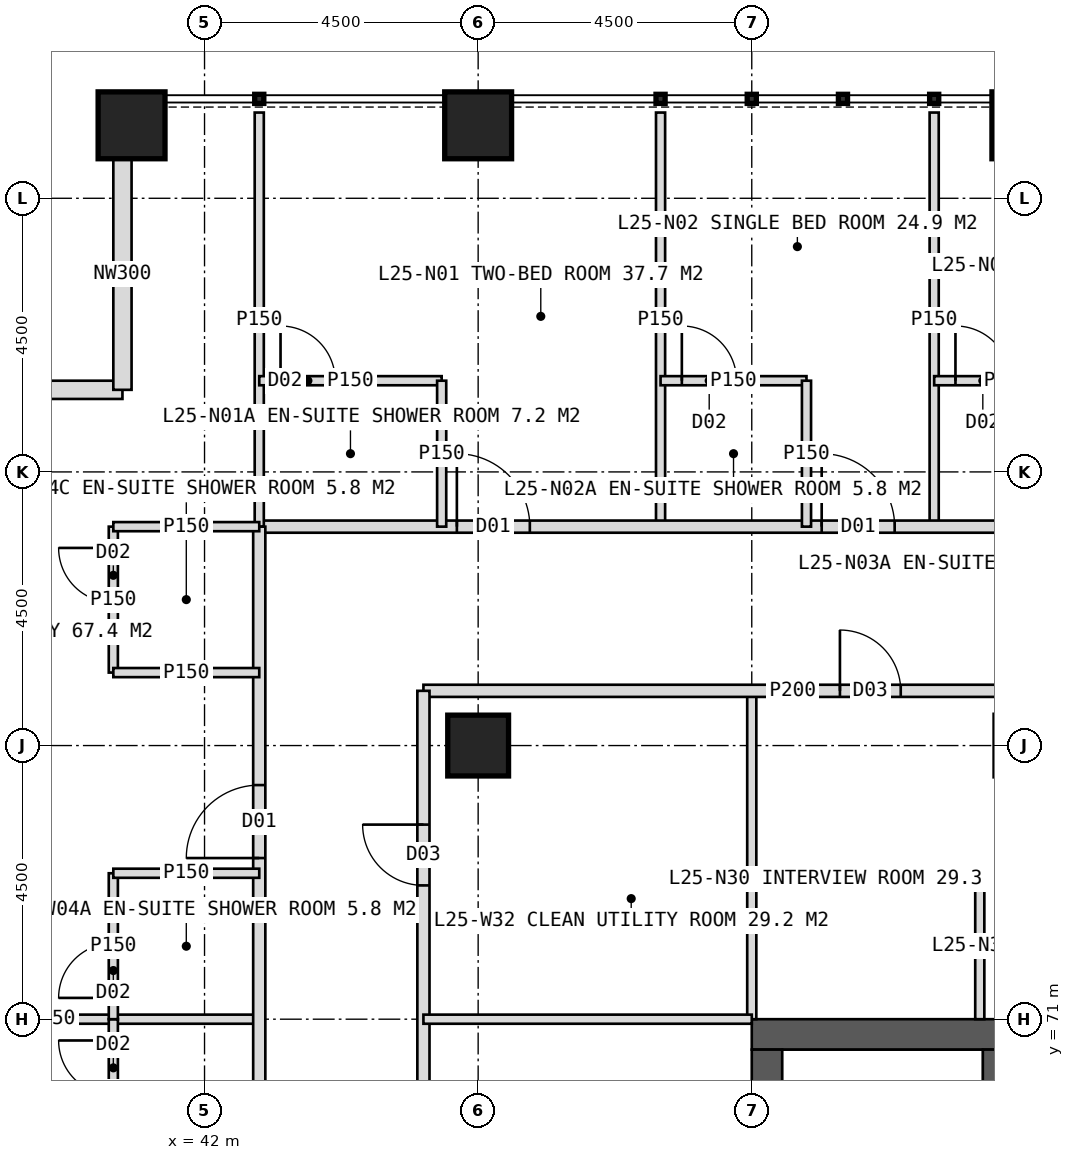
"""IFC4 building model, lengths in metres.
Left out: names, types, materials, properties, quantities, classifications, styles, units other than length and angle.
Written with IfcOpenShell. Run it as: python <this file> out.ifc"""

import sys

from ifc_helpers import new_model, si_unit, direction, frame, frame_2d, origin, origin_2d, place, context, subcontext, project, spatial, rectangle, hollow_rectangle, extrude, element, fill, save


model = new_model("IFC4")
c1 = context("Model", 3, precision=1e-05, world=origin(), true_north=direction((0.0, 1.0)))
c2 = subcontext(c1, "Body", "Model", "MODEL_VIEW")
j1 = project(units=[si_unit("LENGTHUNIT", "METRE"), si_unit("PLANEANGLEUNIT", "RADIAN")], contexts=[c1])
p1 = place(None, origin())
s1 = spatial("IfcSite", under=j1, at=p1, CompositionType="ELEMENT")
p2 = place(p1, origin())
s2 = spatial("IfcBuilding", under=s1, at=p2, CompositionType="ELEMENT")
p3 = place(p2, frame((0.0, 0.0, 108.0)))
s3 = spatial("IfcBuildingStorey", under=s2, at=p3, CompositionType="ELEMENT", Elevation=108.0)
p4 = place(p3, frame((51.0, 70.75, 0.0), z_axis=(0.0, 0.0, 1.0), x_axis=(1.0, 0.0, 0.0)))
e1 = element("IfcWall", 1, at=p4, inside=s3, PredefinedType="SHEAR", context=c2, shape_type="SweptSolid", body=[
    extrude(rectangle(XDim=18.0, YDim=0.5, at=frame_2d((9.0, 0.0))), origin(), (0.0, 0.0, 1.0), 4.0),
])
p5 = place(p4, frame((8.1, 0.0, 0.0)))
e2 = element("IfcOpeningElement", 2, at=p5, cuts=e1, PredefinedType="OPENING", context=c2, shape_type="SweptSolid", body=[
    extrude(rectangle(XDim=1.8, YDim=2.2, at=frame_2d((0.9, 1.1))), frame((0.0, 0.26, 0.0), z_axis=(0.0, -1.0, 0.0), x_axis=(1.0, 0.0, 0.0)), (0.0, 0.0, 1.0), 0.52),
])
p6 = place(p3, frame((51.25, 53.5, 0.0), z_axis=(0.0, 0.0, 1.0), x_axis=(0.0, 1.0, 0.0)))
e3 = element("IfcWall", 3, at=p6, inside=s3, PredefinedType="SHEAR", context=c2, shape_type="SweptSolid", body=[
    extrude(rectangle(XDim=17.0, YDim=0.5, at=frame_2d((8.5, 0.0))), origin(), (0.0, 0.0, 1.0), 4.0),
])
p7 = place(p6, frame((6.0, 0.0, 0.0)))
e4 = element("IfcOpeningElement", 4, at=p7, cuts=e3, PredefinedType="OPENING", context=c2, shape_type="SweptSolid", body=[
    extrude(rectangle(XDim=1.5, YDim=2.2, at=frame_2d((0.75, 1.1))), frame((0.0, 0.26, 0.0), z_axis=(0.0, -1.0, 0.0), x_axis=(1.0, 0.0, 0.0)), (0.0, 0.0, 1.0), 0.52),
])
p8 = place(p3, frame((54.95, 53.5, 0.0), z_axis=(0.0, 0.0, 1.0), x_axis=(0.0, 1.0, 0.0)))
e5 = element("IfcWall", 5, at=p8, inside=s3, PredefinedType="SHEAR", context=c2, shape_type="SweptSolid", body=[
    extrude(rectangle(XDim=17.0, YDim=0.3, at=frame_2d((8.5, 0.0))), origin(), (0.0, 0.0, 1.0), 4.0),
])
p9 = place(p3, frame((46.5, 75.5, 0.0), z_axis=(0.0, 0.0, 1.0), x_axis=(1.0, 0.0, 0.0)))
e6 = element("IfcColumn", 6, at=p9, inside=s3, PredefinedType="COLUMN", context=c2, shape_type="SweptSolid", body=[
    extrude(hollow_rectangle(XDim=1.0, YDim=1.0, WallThickness=0.1, at=origin_2d()), origin(), (0.0, 0.0, 1.0), 4.0),
])
for number, where, z_axis, x_axis in (
    (7, (40.8, 85.7, 0.0), (0.0, 0.0, 1.0), (1.0, 0.0, 0.0)),
    (8, (46.5, 85.7, 0.0), (0.0, 0.0, 1.0), (1.0, 0.0, 0.0)),
    (9, (55.5, 85.7, 0.0), (0.0, 0.0, 1.0), (1.0, 0.0, 0.0)),
):
    element("IfcColumn", number, at=place(p3, frame(where, z_axis=z_axis, x_axis=x_axis)), inside=s3, PredefinedType="COLUMN", context=c2, shape_type="SweptSolid", body=[
        extrude(hollow_rectangle(XDim=1.1, YDim=1.1, WallThickness=0.1, at=origin_2d()), origin(), (0.0, 0.0, 1.0), 4.0),
    ])
for number, where, z_axis, x_axis in (
    (10, (36.85, 81.35, 0.0), (0.0, 0.0, 1.0), (1.0, 0.0, 0.0)),
    (11, (40.65, 81.35, 0.0), (0.0, 0.0, 1.0), (0.0, 1.0, 0.0)),
):
    element("IfcWall", number, at=place(p3, frame(where, z_axis=z_axis, x_axis=x_axis)), inside=s3, PredefinedType="ELEMENTEDWALL", context=c2, shape_type="SweptSolid", body=[
        extrude(rectangle(XDim=3.8, YDim=0.3, at=frame_2d((1.9, 0.0))), origin(), (0.0, 0.0, 1.0), 4.0),
    ])
for number, where, z_axis, x_axis in (
    (12, (49.5, 79.1, 0.0), (0.0, 0.0, 1.0), (0.0, 1.0, 0.0)),
    (13, (54.0, 79.1, 0.0), (0.0, 0.0, 1.0), (0.0, 1.0, 0.0)),
):
    element("IfcWall", number, at=place(p3, frame(where, z_axis=z_axis, x_axis=x_axis)), inside=s3, PredefinedType="PARTITIONING", context=c2, shape_type="SweptSolid", body=[
        extrude(rectangle(XDim=6.81, YDim=0.15, at=frame_2d((3.405, 0.0))), origin(), (0.0, 0.0, 1.0), 3.75),
    ])
p10 = place(p3, frame((42.9, 79.1, 0.0), z_axis=(0.0, 0.0, 1.0), x_axis=(1.0, 0.0, 0.0)))
e14 = element("IfcWall", 14, at=p10, inside=s3, PredefinedType="PARTITIONING", context=c2, shape_type="SweptSolid", body=[
    extrude(rectangle(XDim=34.2, YDim=0.2, at=frame_2d((17.1, 0.0))), origin(), (0.0, 0.0, 1.0), 3.75),
])
p11 = place(p10, frame((3.25, 0.0, 0.0)))
e15 = element("IfcOpeningElement", 15, at=p11, cuts=e14, PredefinedType="OPENING", context=c2, shape_type="SweptSolid", body=[
    extrude(rectangle(XDim=1.2, YDim=2.2, at=frame_2d((0.6, 1.1))), frame((0.0, 0.11, 0.0), z_axis=(0.0, -1.0, 0.0), x_axis=(1.0, 0.0, 0.0)), (0.0, 0.0, 1.0), 0.22),
])
p12 = place(p10, frame((9.25, 0.0, 0.0)))
e16 = element("IfcOpeningElement", 16, at=p12, cuts=e14, PredefinedType="OPENING", context=c2, shape_type="SweptSolid", body=[
    extrude(rectangle(XDim=1.2, YDim=2.2, at=frame_2d((0.6, 1.1))), frame((0.0, 0.11, 0.0), z_axis=(0.0, -1.0, 0.0), x_axis=(1.0, 0.0, 0.0)), (0.0, 0.0, 1.0), 0.22),
])
p13 = place(p10, frame((13.75, 0.0, 0.0)))
e17 = element("IfcOpeningElement", 17, at=p13, cuts=e14, PredefinedType="OPENING", context=c2, shape_type="SweptSolid", body=[
    extrude(rectangle(XDim=1.2, YDim=2.2, at=frame_2d((0.6, 1.1))), frame((0.0, 0.11, 0.0), z_axis=(0.0, -1.0, 0.0), x_axis=(1.0, 0.0, 0.0)), (0.0, 0.0, 1.0), 0.22),
])
p14 = place(p10, frame((19.6, 0.0, 0.0)))
e18 = element("IfcOpeningElement", 18, at=p14, cuts=e14, PredefinedType="OPENING", context=c2, shape_type="SweptSolid", body=[
    extrude(rectangle(XDim=1.0, YDim=2.1, at=frame_2d((0.5, 1.05))), frame((0.0, 0.11, 0.0), z_axis=(0.0, -1.0, 0.0), x_axis=(1.0, 0.0, 0.0)), (0.0, 0.0, 1.0), 0.22),
])
p15 = place(p10, frame((27.25, 0.0, 0.0)))
e19 = element("IfcOpeningElement", 19, at=p15, cuts=e14, PredefinedType="OPENING", context=c2, shape_type="SweptSolid", body=[
    extrude(rectangle(XDim=1.2, YDim=2.2, at=frame_2d((0.6, 1.1))), frame((0.0, 0.11, 0.0), z_axis=(0.0, -1.0, 0.0), x_axis=(1.0, 0.0, 0.0)), (0.0, 0.0, 1.0), 0.22),
])
p16 = place(p3, frame((42.9, 79.1, 0.0), z_axis=(0.0, 0.0, 1.0), x_axis=(0.0, 1.0, 0.0)))
e20 = element("IfcWall", 20, at=p16, inside=s3, PredefinedType="PARTITIONING", context=c2, shape_type="SweptSolid", body=[
    extrude(rectangle(XDim=6.81, YDim=0.15, at=frame_2d((3.405, 0.0))), origin(), (0.0, 0.0, 1.0), 3.75),
])
p17 = place(p3, frame((42.9, 81.5, 0.0), z_axis=(0.0, 0.0, 1.0), x_axis=(1.0, 0.0, 0.0)))
e21 = element("IfcWall", 21, at=p17, inside=s3, PredefinedType="PARTITIONING", context=c2, shape_type="SweptSolid", body=[
    extrude(rectangle(XDim=3.0, YDim=0.15, at=frame_2d((1.5, 0.0))), origin(), (0.0, 0.0, 1.0), 3.75),
])
p18 = place(p17, frame((0.35, 0.0, 0.0)))
e22 = element("IfcOpeningElement", 22, at=p18, cuts=e21, PredefinedType="OPENING", context=c2, shape_type="SweptSolid", body=[
    extrude(rectangle(XDim=0.9, YDim=2.1, at=frame_2d((0.45, 1.05))), frame((0.0, 0.085, 0.0), z_axis=(0.0, -1.0, 0.0), x_axis=(1.0, 0.0, 0.0)), (0.0, 0.0, 1.0), 0.17),
])
p19 = place(p3, frame((45.9, 79.1, 0.0), z_axis=(0.0, 0.0, 1.0), x_axis=(0.0, 1.0, 0.0)))
e23 = element("IfcWall", 23, at=p19, inside=s3, PredefinedType="PARTITIONING", context=c2, shape_type="SweptSolid", body=[
    extrude(rectangle(XDim=2.4, YDim=0.15, at=frame_2d((1.2, 0.0))), origin(), (0.0, 0.0, 1.0), 3.75),
])
p20 = place(p3, frame((49.5, 81.5, 0.0), z_axis=(0.0, 0.0, 1.0), x_axis=(1.0, 0.0, 0.0)))
e24 = element("IfcWall", 24, at=p20, inside=s3, PredefinedType="PARTITIONING", context=c2, shape_type="SweptSolid", body=[
    extrude(rectangle(XDim=2.4, YDim=0.15, at=frame_2d((1.2, 0.0))), origin(), (0.0, 0.0, 1.0), 3.75),
])
p21 = place(p20, frame((0.35, 0.0, 0.0)))
e25 = element("IfcOpeningElement", 25, at=p21, cuts=e24, PredefinedType="OPENING", context=c2, shape_type="SweptSolid", body=[
    extrude(rectangle(XDim=0.9, YDim=2.1, at=frame_2d((0.45, 1.05))), frame((0.0, 0.085, 0.0), z_axis=(0.0, -1.0, 0.0), x_axis=(1.0, 0.0, 0.0)), (0.0, 0.0, 1.0), 0.17),
])
p22 = place(p3, frame((51.9, 79.1, 0.0), z_axis=(0.0, 0.0, 1.0), x_axis=(0.0, 1.0, 0.0)))
e26 = element("IfcWall", 26, at=p22, inside=s3, PredefinedType="PARTITIONING", context=c2, shape_type="SweptSolid", body=[
    extrude(rectangle(XDim=2.4, YDim=0.15, at=frame_2d((1.2, 0.0))), origin(), (0.0, 0.0, 1.0), 3.75),
])
p23 = place(p3, frame((54.0, 81.5, 0.0), z_axis=(0.0, 0.0, 1.0), x_axis=(1.0, 0.0, 0.0)))
e27 = element("IfcWall", 27, at=p23, inside=s3, PredefinedType="PARTITIONING", context=c2, shape_type="SweptSolid", body=[
    extrude(rectangle(XDim=2.4, YDim=0.15, at=frame_2d((1.2, 0.0))), origin(), (0.0, 0.0, 1.0), 3.75),
])
p24 = place(p23, frame((0.35, 0.0, 0.0)))
e28 = element("IfcOpeningElement", 28, at=p24, cuts=e27, PredefinedType="OPENING", context=c2, shape_type="SweptSolid", body=[
    extrude(rectangle(XDim=0.9, YDim=2.1, at=frame_2d((0.45, 1.05))), frame((0.0, 0.085, 0.0), z_axis=(0.0, -1.0, 0.0), x_axis=(1.0, 0.0, 0.0)), (0.0, 0.0, 1.0), 0.17),
])
p25 = place(p3, frame((51.0, 71.0, 0.0), z_axis=(0.0, 0.0, 1.0), x_axis=(0.0, 1.0, 0.0)))
e29 = element("IfcWall", 29, at=p25, inside=s3, PredefinedType="PARTITIONING", context=c2, shape_type="SweptSolid", body=[
    extrude(rectangle(XDim=5.4, YDim=0.15, at=frame_2d((2.7, 0.0))), origin(), (0.0, 0.0, 1.0), 3.75),
])
p26 = place(p3, frame((45.6, 76.4, 0.0), z_axis=(0.0, 0.0, 1.0), x_axis=(1.0, 0.0, 0.0)))
e30 = element("IfcWall", 30, at=p26, inside=s3, PredefinedType="PARTITIONING", context=c2, shape_type="SweptSolid", body=[
    extrude(rectangle(XDim=12.15, YDim=0.2, at=frame_2d((6.075, 0.0))), origin(), (0.0, 0.0, 1.0), 3.75),
])
p27 = place(p26, frame((6.85, 0.0, 0.0)))
e31 = element("IfcOpeningElement", 31, at=p27, cuts=e30, PredefinedType="OPENING", context=c2, shape_type="SweptSolid", body=[
    extrude(rectangle(XDim=1.0, YDim=2.1, at=frame_2d((0.5, 1.05))), frame((0.0, 0.11, 0.0), z_axis=(0.0, -1.0, 0.0), x_axis=(1.0, 0.0, 0.0)), (0.0, 0.0, 1.0), 0.22),
])
p28 = place(p3, frame((54.75, 73.4, 0.0), z_axis=(0.0, 0.0, 1.0), x_axis=(1.0, 0.0, 0.0)))
e32 = element("IfcWall", 32, at=p28, inside=s3, PredefinedType="PARTITIONING", context=c2, shape_type="SweptSolid", body=[
    extrude(rectangle(XDim=3.0, YDim=0.15, at=frame_2d((1.5, 0.0))), origin(), (0.0, 0.0, 1.0), 3.75),
])
p29 = place(p3, frame((54.75, 71.0, 0.0), z_axis=(0.0, 0.0, 1.0), x_axis=(0.0, 1.0, 0.0)))
e33 = element("IfcWall", 33, at=p29, inside=s3, PredefinedType="PARTITIONING", context=c2, shape_type="SweptSolid", body=[
    extrude(rectangle(XDim=2.4, YDim=0.15, at=frame_2d((1.2, 0.0))), origin(), (0.0, 0.0, 1.0), 3.75),
])
p30 = place(p3, frame((42.9, 71.0, 0.0), z_axis=(0.0, 0.0, 1.0), x_axis=(-1.0, 0.0, 0.0)))
e34 = element("IfcWall", 34, at=p30, inside=s3, PredefinedType="PARTITIONING", context=c2, shape_type="SweptSolid", body=[
    extrude(rectangle(XDim=6.81, YDim=0.15, at=frame_2d((3.405, 0.0))), origin(), (0.0, 0.0, 1.0), 3.75),
])
p31 = place(p3, frame((42.9, 44.9, 0.0), z_axis=(0.0, 0.0, 1.0), x_axis=(0.0, 1.0, 0.0)))
e35 = element("IfcWall", 35, at=p31, inside=s3, PredefinedType="PARTITIONING", context=c2, shape_type="SweptSolid", body=[
    extrude(rectangle(XDim=34.2, YDim=0.2, at=frame_2d((17.1, 0.0))), origin(), (0.0, 0.0, 1.0), 3.75),
])
p32 = place(p31, frame((3.25, 0.0, 0.0)))
e36 = element("IfcOpeningElement", 36, at=p32, cuts=e35, PredefinedType="OPENING", context=c2, shape_type="SweptSolid", body=[
    extrude(rectangle(XDim=1.2, YDim=2.2, at=frame_2d((0.6, 1.1))), frame((0.0, 0.11, 0.0), z_axis=(0.0, -1.0, 0.0), x_axis=(1.0, 0.0, 0.0)), (0.0, 0.0, 1.0), 0.22),
])
p33 = place(p31, frame((10.75, 0.0, 0.0)))
e37 = element("IfcOpeningElement", 37, at=p33, cuts=e35, PredefinedType="OPENING", context=c2, shape_type="SweptSolid", body=[
    extrude(rectangle(XDim=1.2, YDim=2.2, at=frame_2d((0.6, 1.1))), frame((0.0, 0.11, 0.0), z_axis=(0.0, -1.0, 0.0), x_axis=(1.0, 0.0, 0.0)), (0.0, 0.0, 1.0), 0.22),
])
p34 = place(p31, frame((19.75, 0.0, 0.0)))
e38 = element("IfcOpeningElement", 38, at=p34, cuts=e35, PredefinedType="OPENING", context=c2, shape_type="SweptSolid", body=[
    extrude(rectangle(XDim=1.2, YDim=2.2, at=frame_2d((0.6, 1.1))), frame((0.0, 0.11, 0.0), z_axis=(0.0, -1.0, 0.0), x_axis=(1.0, 0.0, 0.0)), (0.0, 0.0, 1.0), 0.22),
])
p35 = place(p31, frame((28.75, 0.0, 0.0)))
e39 = element("IfcOpeningElement", 39, at=p35, cuts=e35, PredefinedType="OPENING", context=c2, shape_type="SweptSolid", body=[
    extrude(rectangle(XDim=1.2, YDim=2.2, at=frame_2d((0.6, 1.1))), frame((0.0, 0.11, 0.0), z_axis=(0.0, -1.0, 0.0), x_axis=(1.0, 0.0, 0.0)), (0.0, 0.0, 1.0), 0.22),
])
p36 = place(p3, frame((40.5, 68.6, 0.0), z_axis=(0.0, 0.0, 1.0), x_axis=(0.0, 1.0, 0.0)))
e40 = element("IfcWall", 40, at=p36, inside=s3, PredefinedType="PARTITIONING", context=c2, shape_type="SweptSolid", body=[
    extrude(rectangle(XDim=2.4, YDim=0.15, at=frame_2d((1.2, 0.0))), origin(), (0.0, 0.0, 1.0), 3.75),
])
p37 = place(p36, frame((1.15, 0.0, 0.0)))
e41 = element("IfcOpeningElement", 41, at=p37, cuts=e40, PredefinedType="OPENING", context=c2, shape_type="SweptSolid", body=[
    extrude(rectangle(XDim=0.9, YDim=2.1, at=frame_2d((0.45, 1.05))), frame((0.0, 0.085, 0.0), z_axis=(0.0, -1.0, 0.0), x_axis=(1.0, 0.0, 0.0)), (0.0, 0.0, 1.0), 0.17),
])
p38 = place(p3, frame((40.5, 71.0, 0.0), z_axis=(0.0, 0.0, 1.0), x_axis=(0.0, 1.0, 0.0)))
e42 = element("IfcWall", 42, at=p38, inside=s3, PredefinedType="PARTITIONING", context=c2, shape_type="SweptSolid", body=[
    extrude(rectangle(XDim=2.4, YDim=0.15, at=frame_2d((1.2, 0.0))), origin(), (0.0, 0.0, 1.0), 3.75),
])
p39 = place(p38, frame((0.35, 0.0, 0.0)))
e43 = element("IfcOpeningElement", 43, at=p39, cuts=e42, PredefinedType="OPENING", context=c2, shape_type="SweptSolid", body=[
    extrude(rectangle(XDim=0.9, YDim=2.1, at=frame_2d((0.45, 1.05))), frame((0.0, 0.085, 0.0), z_axis=(0.0, -1.0, 0.0), x_axis=(1.0, 0.0, 0.0)), (0.0, 0.0, 1.0), 0.17),
])
p40 = place(p3, frame((42.9, 73.4, 0.0), z_axis=(0.0, 0.0, 1.0), x_axis=(-1.0, 0.0, 0.0)))
e44 = element("IfcWall", 44, at=p40, inside=s3, PredefinedType="PARTITIONING", context=c2, shape_type="SweptSolid", body=[
    extrude(rectangle(XDim=2.4, YDim=0.15, at=frame_2d((1.2, 0.0))), origin(), (0.0, 0.0, 1.0), 3.75),
])
p41 = place(p3, frame((40.5, 76.7, 0.0), z_axis=(0.0, 0.0, 1.0), x_axis=(0.0, 1.0, 0.0)))
e45 = element("IfcWall", 45, at=p41, inside=s3, PredefinedType="PARTITIONING", context=c2, shape_type="SweptSolid", body=[
    extrude(rectangle(XDim=2.4, YDim=0.15, at=frame_2d((1.2, 0.0))), origin(), (0.0, 0.0, 1.0), 3.75),
])
p42 = place(p41, frame((1.15, 0.0, 0.0)))
e46 = element("IfcOpeningElement", 46, at=p42, cuts=e45, PredefinedType="OPENING", context=c2, shape_type="SweptSolid", body=[
    extrude(rectangle(XDim=0.9, YDim=2.1, at=frame_2d((0.45, 1.05))), frame((0.0, 0.085, 0.0), z_axis=(0.0, -1.0, 0.0), x_axis=(1.0, 0.0, 0.0)), (0.0, 0.0, 1.0), 0.17),
])
for number, where, z_axis, x_axis in (
    (47, (42.9, 76.7, 0.0), (0.0, 0.0, 1.0), (-1.0, 0.0, 0.0)),
    (48, (42.9, 79.1, 0.0), (0.0, 0.0, 1.0), (-1.0, 0.0, 0.0)),
):
    element("IfcWall", number, at=place(p3, frame(where, z_axis=z_axis, x_axis=x_axis)), inside=s3, PredefinedType="PARTITIONING", context=c2, shape_type="SweptSolid", body=[
        extrude(rectangle(XDim=2.4, YDim=0.15, at=frame_2d((1.2, 0.0))), origin(), (0.0, 0.0, 1.0), 3.75),
    ])
p43 = place(p3, frame((45.6, 62.0, 0.0), z_axis=(0.0, 0.0, 1.0), x_axis=(0.0, 1.0, 0.0)))
e49 = element("IfcWall", 49, at=p43, inside=s3, PredefinedType="PARTITIONING", context=c2, shape_type="SweptSolid", body=[
    extrude(rectangle(XDim=14.4, YDim=0.2, at=frame_2d((7.2, 0.0))), origin(), (0.0, 0.0, 1.0), 3.75),
])
p44 = place(p43, frame((1.45, 0.0, 0.0)))
e50 = element("IfcOpeningElement", 50, at=p44, cuts=e49, PredefinedType="OPENING", context=c2, shape_type="SweptSolid", body=[
    extrude(rectangle(XDim=1.0, YDim=2.1, at=frame_2d((0.5, 1.05))), frame((0.0, 0.11, 0.0), z_axis=(0.0, -1.0, 0.0), x_axis=(1.0, 0.0, 0.0)), (0.0, 0.0, 1.0), 0.22),
])
p45 = place(p43, frame((11.2, 0.0, 0.0)))
e51 = element("IfcOpeningElement", 51, at=p45, cuts=e49, PredefinedType="OPENING", context=c2, shape_type="SweptSolid", body=[
    extrude(rectangle(XDim=1.0, YDim=2.1, at=frame_2d((0.5, 1.05))), frame((0.0, 0.11, 0.0), z_axis=(0.0, -1.0, 0.0), x_axis=(1.0, 0.0, 0.0)), (0.0, 0.0, 1.0), 0.22),
])
p46 = place(p3, frame((51.0, 71.0, 0.0), z_axis=(0.0, 0.0, 1.0), x_axis=(-1.0, 0.0, 0.0)))
e52 = element("IfcWall", 52, at=p46, inside=s3, PredefinedType="PARTITIONING", context=c2, shape_type="SweptSolid", body=[
    extrude(rectangle(XDim=5.4, YDim=0.15, at=frame_2d((2.7, 0.0))), origin(), (0.0, 0.0, 1.0), 3.75),
])
p47 = place(p11, origin())
e53 = element("IfcDoor", 53, at=p47, inside=s3, OperationType="SINGLE_SWING_LEFT", PredefinedType="DOOR", context=c2, shape_type="SweptSolid", body=[
    extrude(rectangle(XDim=1.2, YDim=2.2, at=frame_2d((0.6, 1.1))), frame((0.0, 0.025, 0.0), z_axis=(0.0, -1.0, 0.0), x_axis=(1.0, 0.0, 0.0)), (0.0, 0.0, 1.0), 0.05),
])
fill(e15, e53)
p48 = place(p18, origin())
e54 = element("IfcDoor", 54, at=p48, inside=s3, OperationType="SINGLE_SWING_LEFT", PredefinedType="DOOR", context=c2, shape_type="SweptSolid", body=[
    extrude(rectangle(XDim=0.9, YDim=2.1, at=frame_2d((0.45, 1.05))), frame((0.0, 0.025, 0.0), z_axis=(0.0, -1.0, 0.0), x_axis=(1.0, 0.0, 0.0)), (0.0, 0.0, 1.0), 0.05),
])
fill(e22, e54)
p49 = place(p12, origin())
e55 = element("IfcDoor", 55, at=p49, inside=s3, OperationType="SINGLE_SWING_LEFT", PredefinedType="DOOR", context=c2, shape_type="SweptSolid", body=[
    extrude(rectangle(XDim=1.2, YDim=2.2, at=frame_2d((0.6, 1.1))), frame((0.0, 0.025, 0.0), z_axis=(0.0, -1.0, 0.0), x_axis=(1.0, 0.0, 0.0)), (0.0, 0.0, 1.0), 0.05),
])
fill(e16, e55)
p50 = place(p21, origin())
e56 = element("IfcDoor", 56, at=p50, inside=s3, OperationType="SINGLE_SWING_LEFT", PredefinedType="DOOR", context=c2, shape_type="SweptSolid", body=[
    extrude(rectangle(XDim=0.9, YDim=2.1, at=frame_2d((0.45, 1.05))), frame((0.0, 0.025, 0.0), z_axis=(0.0, -1.0, 0.0), x_axis=(1.0, 0.0, 0.0)), (0.0, 0.0, 1.0), 0.05),
])
fill(e25, e56)
p51 = place(p24, origin())
e57 = element("IfcDoor", 57, at=p51, inside=s3, OperationType="SINGLE_SWING_LEFT", PredefinedType="DOOR", context=c2, shape_type="SweptSolid", body=[
    extrude(rectangle(XDim=0.9, YDim=2.1, at=frame_2d((0.45, 1.05))), frame((0.0, 0.025, 0.0), z_axis=(0.0, -1.0, 0.0), x_axis=(1.0, 0.0, 0.0)), (0.0, 0.0, 1.0), 0.05),
])
fill(e28, e57)
p52 = place(p27, origin())
e58 = element("IfcDoor", 58, at=p52, inside=s3, OperationType="SINGLE_SWING_LEFT", PredefinedType="DOOR", context=c2, shape_type="SweptSolid", body=[
    extrude(rectangle(XDim=1.0, YDim=2.1, at=frame_2d((0.5, 1.05))), frame((0.0, 0.025, 0.0), z_axis=(0.0, -1.0, 0.0), x_axis=(1.0, 0.0, 0.0)), (0.0, 0.0, 1.0), 0.05),
])
fill(e31, e58)
p53 = place(p37, origin())
e59 = element("IfcDoor", 59, at=p53, inside=s3, OperationType="SINGLE_SWING_RIGHT", PredefinedType="DOOR", context=c2, shape_type="SweptSolid", body=[
    extrude(rectangle(XDim=0.9, YDim=2.1, at=frame_2d((0.45, 1.05))), frame((0.0, 0.025, 0.0), z_axis=(0.0, -1.0, 0.0), x_axis=(1.0, 0.0, 0.0)), (0.0, 0.0, 1.0), 0.05),
])
fill(e41, e59)
p54 = place(p35, origin())
e60 = element("IfcDoor", 60, at=p54, inside=s3, OperationType="SINGLE_SWING_LEFT", PredefinedType="DOOR", context=c2, shape_type="SweptSolid", body=[
    extrude(rectangle(XDim=1.2, YDim=2.2, at=frame_2d((0.6, 1.1))), frame((0.0, 0.025, 0.0), z_axis=(0.0, -1.0, 0.0), x_axis=(1.0, 0.0, 0.0)), (0.0, 0.0, 1.0), 0.05),
])
fill(e39, e60)
p55 = place(p39, origin())
e61 = element("IfcDoor", 61, at=p55, inside=s3, OperationType="SINGLE_SWING_LEFT", PredefinedType="DOOR", context=c2, shape_type="SweptSolid", body=[
    extrude(rectangle(XDim=0.9, YDim=2.1, at=frame_2d((0.45, 1.05))), frame((0.0, 0.025, 0.0), z_axis=(0.0, -1.0, 0.0), x_axis=(1.0, 0.0, 0.0)), (0.0, 0.0, 1.0), 0.05),
])
fill(e43, e61)
p56 = place(p42, origin())
e62 = element("IfcDoor", 62, at=p56, inside=s3, OperationType="SINGLE_SWING_RIGHT", PredefinedType="DOOR", context=c2, shape_type="SweptSolid", body=[
    extrude(rectangle(XDim=0.9, YDim=2.1, at=frame_2d((0.45, 1.05))), frame((0.0, 0.025, 0.0), z_axis=(0.0, -1.0, 0.0), x_axis=(1.0, 0.0, 0.0)), (0.0, 0.0, 1.0), 0.05),
])
fill(e46, e62)
p57 = place(p45, origin())
e63 = element("IfcDoor", 63, at=p57, inside=s3, OperationType="SINGLE_SWING_RIGHT", PredefinedType="DOOR", context=c2, shape_type="SweptSolid", body=[
    extrude(rectangle(XDim=1.0, YDim=2.1, at=frame_2d((0.5, 1.05))), frame((0.0, 0.025, 0.0), z_axis=(0.0, -1.0, 0.0), x_axis=(1.0, 0.0, 0.0)), (0.0, 0.0, 1.0), 0.05),
])
fill(e51, e63)
save(model, sys.argv[1])
